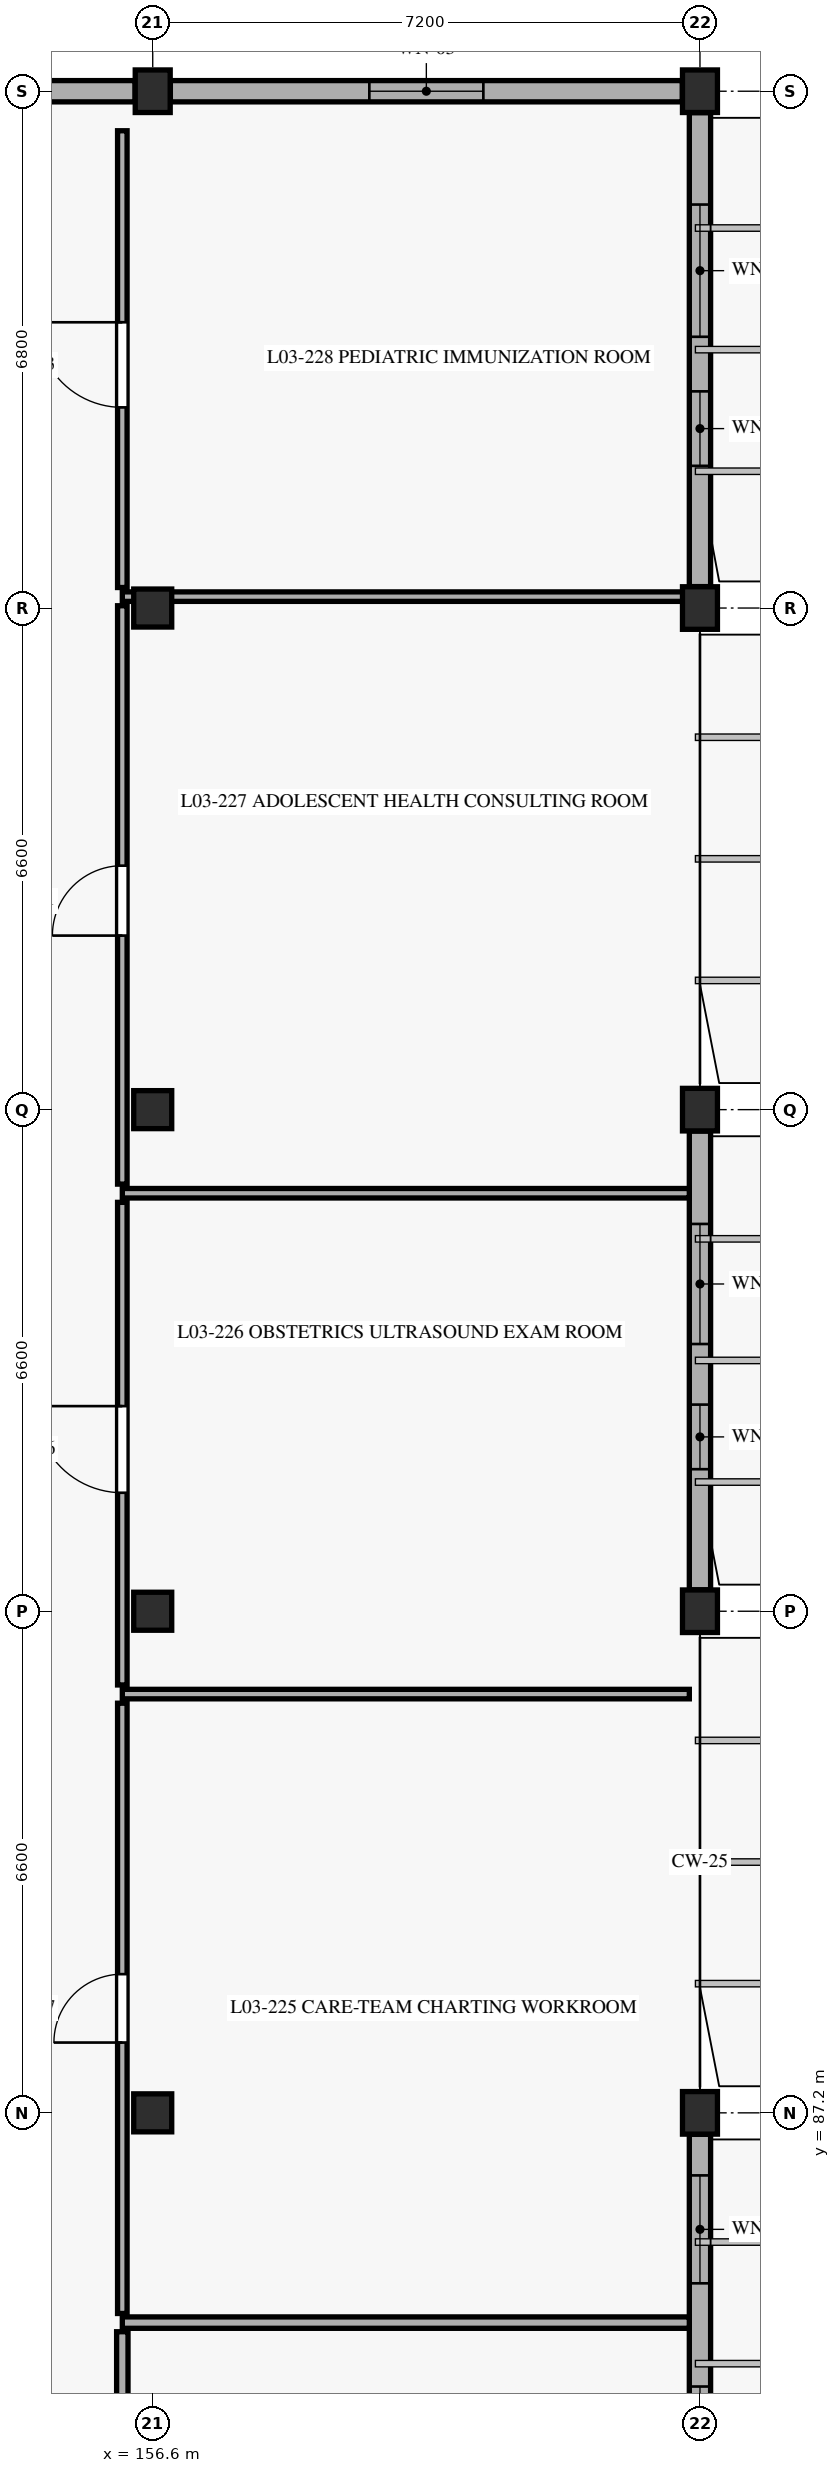
"""IFC4 building model, lengths in metres.
Left out: names, types, materials, properties, quantities, classifications, styles, units other than length and angle.
Written with IfcOpenShell. Run it as: python <this file> out.ifc"""

import sys

from ifc_helpers import new_model, si_unit, direction, frame, frame_2d, origin, origin_with_axes, origin_2d, place, context, subcontext, project, spatial, rectangle, extrude, element, fill, save


model = new_model("IFC4")
c1 = context("Model", 3, precision=1e-05, world=origin(), true_north=direction((0.0, 1.0)))
c2 = subcontext(c1, "Body", "Model", "MODEL_VIEW")
j1 = project(units=[si_unit("LENGTHUNIT", "METRE"), si_unit("PLANEANGLEUNIT", "RADIAN")], contexts=[c1])
p1 = place(None, origin())
s1 = spatial("IfcSite", under=j1, at=p1, CompositionType="ELEMENT")
p2 = place(p1, origin())
s2 = spatial("IfcBuilding", under=s1, at=p2, CompositionType="ELEMENT")
p3 = place(p2, frame((0.0, 0.0, 9.3)))
s3 = spatial("IfcBuildingStorey", under=s2, at=p3, CompositionType="ELEMENT", Elevation=9.3)
for number, where, z_axis, x_axis in (
    (1, (156.6, 87.2, 0.0), (0.0, 0.0, 1.0), (1.0, 0.0, 0.0)),
    (2, (156.6, 93.8, 0.0), (0.0, 0.0, 1.0), (1.0, 0.0, 0.0)),
    (3, (156.6, 100.4, 0.0), (0.0, 0.0, 1.0), (1.0, 0.0, 0.0)),
    (4, (156.6, 107.0, 0.0), (0.0, 0.0, 1.0), (1.0, 0.0, 0.0)),
):
    element("IfcColumn", number, at=place(p3, frame(where, z_axis=z_axis, x_axis=x_axis)), inside=s3, PredefinedType="COLUMN", context=c2, shape_type="SweptSolid", body=[
        extrude(rectangle(XDim=0.5, YDim=0.5, at=origin_2d()), origin(), (0.0, 0.0, 1.0), 4.2),
    ])
for number, where, z_axis, x_axis in (
    (5, (156.6, 113.8, 0.0), (0.0, 0.0, 1.0), (1.0, 0.0, 0.0)),
    (6, (163.8, 87.2, 0.0), (0.0, 0.0, 1.0), (1.0, 0.0, 0.0)),
    (7, (163.8, 93.8, 0.0), (0.0, 0.0, 1.0), (1.0, 0.0, 0.0)),
    (8, (163.8, 100.4, 0.0), (0.0, 0.0, 1.0), (1.0, 0.0, 0.0)),
    (9, (163.8, 107.0, 0.0), (0.0, 0.0, 1.0), (1.0, 0.0, 0.0)),
    (10, (163.8, 113.8, 0.0), (0.0, 0.0, 1.0), (1.0, 0.0, 0.0)),
):
    element("IfcColumn", number, at=place(p3, frame(where, z_axis=z_axis, x_axis=x_axis)), inside=s3, PredefinedType="COLUMN", context=c2, shape_type="SweptSolid", body=[
        extrude(rectangle(XDim=0.46, YDim=0.56, at=origin_2d()), origin(), (0.0, 0.0, 1.0), 4.2),
    ])
p4 = place(p3, frame((163.8, 80.882, 0.0), z_axis=(0.0, 0.0, 1.0), x_axis=(0.0, 1.0, 0.0)))
e11 = element("IfcWall", 11, at=p4, inside=s3, PredefinedType="SOLIDWALL", context=c2, shape_type="SweptSolid", body=[
    extrude(rectangle(XDim=6.036, YDim=0.28, at=frame_2d((3.018, 0.0))), origin(), (0.0, 0.0, 1.0), 3.48),
])
p5 = place(p4, frame((0.867, 0.0, 0.88)))
e12 = element("IfcOpeningElement", 12, at=p5, cuts=e11, PredefinedType="OPENING", context=c2, shape_type="SweptSolid", body=[
    extrude(rectangle(XDim=1.85, YDim=1.65, at=frame_2d((0.925, 0.825))), frame((0.0, 0.15, 0.0), z_axis=(0.0, -1.0, 0.0), x_axis=(1.0, 0.0, 0.0)), (0.0, 0.0, 1.0), 0.3),
])
p6 = place(p4, frame((4.075, 0.0, 0.88)))
e13 = element("IfcOpeningElement", 13, at=p6, cuts=e11, PredefinedType="OPENING", context=c2, shape_type="SweptSolid", body=[
    extrude(rectangle(XDim=1.42, YDim=1.9, at=frame_2d((0.71, 0.95))), frame((0.0, 0.15, 0.0), z_axis=(0.0, -1.0, 0.0), x_axis=(1.0, 0.0, 0.0)), (0.0, 0.0, 1.0), 0.3),
])
p7 = place(p3, frame((163.8, 94.082, 0.0), z_axis=(0.0, 0.0, 1.0), x_axis=(0.0, 1.0, 0.0)))
e14 = element("IfcWall", 14, at=p7, inside=s3, PredefinedType="SOLIDWALL", context=c2, shape_type="SweptSolid", body=[
    extrude(rectangle(XDim=6.036, YDim=0.28, at=frame_2d((3.018, 0.0))), origin(), (0.0, 0.0, 1.0), 3.48),
])
p8 = place(p7, frame((1.587, 0.0, 0.88)))
e15 = element("IfcOpeningElement", 15, at=p8, cuts=e14, PredefinedType="OPENING", context=c2, shape_type="SweptSolid", body=[
    extrude(rectangle(XDim=0.85, YDim=2.1, at=frame_2d((0.425, 1.05))), frame((0.0, 0.15, 0.0), z_axis=(0.0, -1.0, 0.0), x_axis=(1.0, 0.0, 0.0)), (0.0, 0.0, 1.0), 0.3),
])
p9 = place(p7, frame((3.234, 0.0, 0.88)))
e16 = element("IfcOpeningElement", 16, at=p9, cuts=e14, PredefinedType="OPENING", context=c2, shape_type="SweptSolid", body=[
    extrude(rectangle(XDim=1.58, YDim=1.9, at=frame_2d((0.79, 0.95))), frame((0.0, 0.15, 0.0), z_axis=(0.0, -1.0, 0.0), x_axis=(1.0, 0.0, 0.0)), (0.0, 0.0, 1.0), 0.3),
])
p10 = place(p3, frame((163.8, 107.282, 0.0), z_axis=(0.0, 0.0, 1.0), x_axis=(0.0, 1.0, 0.0)))
e17 = element("IfcWall", 17, at=p10, inside=s3, PredefinedType="SOLIDWALL", context=c2, shape_type="SweptSolid", body=[
    extrude(rectangle(XDim=6.236, YDim=0.28, at=frame_2d((3.118, 0.0))), origin(), (0.0, 0.0, 1.0), 3.48),
])
p11 = place(p10, frame((1.589, 0.0, 0.88)))
e18 = element("IfcOpeningElement", 18, at=p11, cuts=e17, PredefinedType="OPENING", context=c2, shape_type="SweptSolid", body=[
    extrude(rectangle(XDim=0.98, YDim=2.1, at=frame_2d((0.49, 1.05))), frame((0.0, 0.15, 0.0), z_axis=(0.0, -1.0, 0.0), x_axis=(1.0, 0.0, 0.0)), (0.0, 0.0, 1.0), 0.3),
])
p12 = place(p10, frame((3.287, 0.0, 0.88)))
e19 = element("IfcOpeningElement", 19, at=p12, cuts=e17, PredefinedType="OPENING", context=c2, shape_type="SweptSolid", body=[
    extrude(rectangle(XDim=1.74, YDim=1.9, at=frame_2d((0.87, 0.95))), frame((0.0, 0.15, 0.0), z_axis=(0.0, -1.0, 0.0), x_axis=(1.0, 0.0, 0.0)), (0.0, 0.0, 1.0), 0.3),
])
p13 = place(p3, frame((163.568, 113.8, 0.0), z_axis=(0.0, 0.0, 1.0), x_axis=(-1.0, 0.0, 0.0)))
e20 = element("IfcWall", 20, at=p13, inside=s3, PredefinedType="SOLIDWALL", context=c2, shape_type="SweptSolid", body=[
    extrude(rectangle(XDim=6.736, YDim=0.28, at=frame_2d((3.368, 0.0))), origin(), (0.0, 0.0, 1.0), 3.4),
])
p14 = place(p13, frame((2.618, 0.0, 0.9)))
e21 = element("IfcOpeningElement", 21, at=p14, cuts=e20, PredefinedType="OPENING", context=c2, shape_type="SweptSolid", body=[
    extrude(rectangle(XDim=1.5, YDim=2.2, at=frame_2d((0.75, 1.1))), frame((0.0, 0.15, 0.0), z_axis=(0.0, -1.0, 0.0), x_axis=(1.0, 0.0, 0.0)), (0.0, 0.0, 1.0), 0.3),
])
p15 = place(p3, frame((156.368, 113.8, 0.0), z_axis=(0.0, 0.0, 1.0), x_axis=(-1.0, 0.0, 0.0)))
e22 = element("IfcWall", 22, at=p15, inside=s3, PredefinedType="SOLIDWALL", context=c2, shape_type="SweptSolid", body=[
    extrude(rectangle(XDim=7.336, YDim=0.28, at=frame_2d((3.668, 0.0))), origin(), (0.0, 0.0, 1.0), 3.4),
])
p16 = place(p15, frame((2.918, 0.0, 0.9)))
e23 = element("IfcOpeningElement", 23, at=p16, cuts=e22, PredefinedType="OPENING", context=c2, shape_type="SweptSolid", body=[
    extrude(rectangle(XDim=1.5, YDim=2.2, at=frame_2d((0.75, 1.1))), frame((0.0, 0.15, 0.0), z_axis=(0.0, -1.0, 0.0), x_axis=(1.0, 0.0, 0.0)), (0.0, 0.0, 1.0), 0.3),
])
p17 = place(p3, frame((156.2, 77.06, 0.0), z_axis=(0.0, 0.0, 1.0), x_axis=(0.0, 1.0, 0.0)))
e24 = element("IfcWall", 24, at=p17, inside=s3, PredefinedType="PARTITIONING", context=c2, shape_type="SweptSolid", body=[
    extrude(rectangle(XDim=7.26, YDim=0.15, at=frame_2d((3.63, 0.0))), origin(), (0.0, 0.0, 1.0), 3.495),
])
p18 = place(p17, frame((4.353, 0.0, 0.0)))
e25 = element("IfcOpeningElement", 25, at=p18, cuts=e24, PredefinedType="OPENING", context=c2, shape_type="SweptSolid", body=[
    extrude(rectangle(XDim=0.98, YDim=2.12, at=frame_2d((0.49, 1.06))), frame((0.0, 0.085, 0.0), z_axis=(0.0, -1.0, 0.0), x_axis=(1.0, 0.0, 0.0)), (0.0, 0.0, 1.0), 0.17),
])
p19 = place(p3, frame((156.2, 84.44, 0.0), z_axis=(0.0, 0.0, 1.0), x_axis=(1.0, 0.0, 0.0)))
e26 = element("IfcWall", 26, at=p19, inside=s3, PredefinedType="PARTITIONING", context=c2, shape_type="SweptSolid", body=[
    extrude(rectangle(XDim=7.46, YDim=0.15, at=frame_2d((3.73, 0.0))), origin(), (0.0, 0.0, 1.0), 3.475),
])
p20 = place(p3, frame((156.2, 84.56, 0.0), z_axis=(0.0, 0.0, 1.0), x_axis=(0.0, 1.0, 0.0)))
e27 = element("IfcWall", 27, at=p20, inside=s3, PredefinedType="PARTITIONING", context=c2, shape_type="SweptSolid", body=[
    extrude(rectangle(XDim=8.03, YDim=0.125, at=frame_2d((4.015, 0.0))), origin(), (0.0, 0.0, 1.0), 3.495),
])
p21 = place(p20, frame((3.565, 0.0, 0.0)))
e28 = element("IfcOpeningElement", 28, at=p21, cuts=e27, PredefinedType="OPENING", context=c2, shape_type="SweptSolid", body=[
    extrude(rectangle(XDim=0.9, YDim=2.12, at=frame_2d((0.45, 1.06))), frame((0.0, 0.073, 0.0), z_axis=(0.0, -1.0, 0.0), x_axis=(1.0, 0.0, 0.0)), (0.0, 0.0, 1.0), 0.145),
])
p22 = place(p3, frame((156.2, 92.71, 0.0), z_axis=(0.0, 0.0, 1.0), x_axis=(1.0, 0.0, 0.0)))
e29 = element("IfcWall", 29, at=p22, inside=s3, PredefinedType="PARTITIONING", context=c2, shape_type="SweptSolid", body=[
    extrude(rectangle(XDim=7.46, YDim=0.125, at=frame_2d((3.73, 0.0))), origin(), (0.0, 0.0, 1.0), 3.475),
])
p23 = place(p3, frame((156.2, 92.83, 0.0), z_axis=(0.0, 0.0, 1.0), x_axis=(0.0, 1.0, 0.0)))
e30 = element("IfcWall", 30, at=p23, inside=s3, PredefinedType="PARTITIONING", context=c2, shape_type="SweptSolid", body=[
    extrude(rectangle(XDim=6.35, YDim=0.125, at=frame_2d((3.175, 0.0))), origin(), (0.0, 0.0, 1.0), 3.495),
])
p24 = place(p23, frame((2.529, 0.0, 0.0)))
e31 = element("IfcOpeningElement", 31, at=p24, cuts=e30, PredefinedType="OPENING", context=c2, shape_type="SweptSolid", body=[
    extrude(rectangle(XDim=1.14, YDim=2.22, at=frame_2d((0.57, 1.11))), frame((0.0, 0.073, 0.0), z_axis=(0.0, -1.0, 0.0), x_axis=(1.0, 0.0, 0.0)), (0.0, 0.0, 1.0), 0.145),
])
p25 = place(p3, frame((156.2, 99.3, 0.0), z_axis=(0.0, 0.0, 1.0), x_axis=(1.0, 0.0, 0.0)))
e32 = element("IfcWall", 32, at=p25, inside=s3, PredefinedType="PARTITIONING", context=c2, shape_type="SweptSolid", body=[
    extrude(rectangle(XDim=7.46, YDim=0.125, at=frame_2d((3.73, 0.0))), origin(), (0.0, 0.0, 1.0), 3.475),
])
p26 = place(p3, frame((156.2, 99.42, 0.0), z_axis=(0.0, 0.0, 1.0), x_axis=(0.0, 1.0, 0.0)))
e33 = element("IfcWall", 33, at=p26, inside=s3, PredefinedType="PARTITIONING", context=c2, shape_type="SweptSolid", body=[
    extrude(rectangle(XDim=7.61, YDim=0.125, at=frame_2d((3.805, 0.0))), origin(), (0.0, 0.0, 1.0), 3.495),
])
p27 = place(p26, frame((3.27, 0.0, 0.0)))
e34 = element("IfcOpeningElement", 34, at=p27, cuts=e33, PredefinedType="OPENING", context=c2, shape_type="SweptSolid", body=[
    extrude(rectangle(XDim=0.92, YDim=2.15, at=frame_2d((0.46, 1.075))), frame((0.0, 0.073, 0.0), z_axis=(0.0, -1.0, 0.0), x_axis=(1.0, 0.0, 0.0)), (0.0, 0.0, 1.0), 0.145),
])
p28 = place(p3, frame((156.2, 107.15, 0.0), z_axis=(0.0, 0.0, 1.0), x_axis=(1.0, 0.0, 0.0)))
e35 = element("IfcWall", 35, at=p28, inside=s3, PredefinedType="PARTITIONING", context=c2, shape_type="SweptSolid", body=[
    extrude(rectangle(XDim=7.46, YDim=0.125, at=frame_2d((3.73, 0.0))), origin(), (0.0, 0.0, 1.0), 3.495),
])
p29 = place(p3, frame((156.2, 107.27, 0.0), z_axis=(0.0, 0.0, 1.0), x_axis=(0.0, 1.0, 0.0)))
e36 = element("IfcWall", 36, at=p29, inside=s3, PredefinedType="PARTITIONING", context=c2, shape_type="SweptSolid", body=[
    extrude(rectangle(XDim=6.01, YDim=0.125, at=frame_2d((3.005, 0.0))), origin(), (0.0, 0.0, 1.0), 3.495),
])
p30 = place(p29, frame((2.37, 0.0, 0.0)))
e37 = element("IfcOpeningElement", 37, at=p30, cuts=e36, PredefinedType="OPENING", context=c2, shape_type="SweptSolid", body=[
    extrude(rectangle(XDim=1.12, YDim=2.2, at=frame_2d((0.56, 1.1))), frame((0.0, 0.073, 0.0), z_axis=(0.0, -1.0, 0.0), x_axis=(1.0, 0.0, 0.0)), (0.0, 0.0, 1.0), 0.145),
])
p31 = place(p5, origin_with_axes())
e38 = element("IfcWindow", 38, at=p31, inside=s3, PartitioningType="SINGLE_PANEL", PredefinedType="WINDOW", context=c2, shape_type="SweptSolid", body=[
    extrude(rectangle(XDim=1.85, YDim=1.65, at=frame_2d((0.925, 0.825))), frame((0.0, 0.03, 0.0), z_axis=(0.0, -1.0, 0.0), x_axis=(1.0, 0.0, 0.0)), (0.0, 0.0, 1.0), 0.06),
])
fill(e12, e38)
p32 = place(p6, origin_with_axes())
e39 = element("IfcWindow", 39, at=p32, inside=s3, PartitioningType="SINGLE_PANEL", PredefinedType="WINDOW", context=c2, shape_type="SweptSolid", body=[
    extrude(rectangle(XDim=1.42, YDim=1.9, at=frame_2d((0.71, 0.95))), frame((0.0, 0.03, 0.0), z_axis=(0.0, -1.0, 0.0), x_axis=(1.0, 0.0, 0.0)), (0.0, 0.0, 1.0), 0.06),
])
fill(e13, e39)
p33 = place(p8, origin_with_axes())
e40 = element("IfcWindow", 40, at=p33, inside=s3, PartitioningType="SINGLE_PANEL", PredefinedType="WINDOW", context=c2, shape_type="SweptSolid", body=[
    extrude(rectangle(XDim=0.85, YDim=2.1, at=frame_2d((0.425, 1.05))), frame((0.0, 0.03, 0.0), z_axis=(0.0, -1.0, 0.0), x_axis=(1.0, 0.0, 0.0)), (0.0, 0.0, 1.0), 0.06),
])
fill(e15, e40)
p34 = place(p9, origin_with_axes())
e41 = element("IfcWindow", 41, at=p34, inside=s3, PartitioningType="SINGLE_PANEL", PredefinedType="WINDOW", context=c2, shape_type="SweptSolid", body=[
    extrude(rectangle(XDim=1.58, YDim=1.9, at=frame_2d((0.79, 0.95))), frame((0.0, 0.03, 0.0), z_axis=(0.0, -1.0, 0.0), x_axis=(1.0, 0.0, 0.0)), (0.0, 0.0, 1.0), 0.06),
])
fill(e16, e41)
p35 = place(p11, origin_with_axes())
e42 = element("IfcWindow", 42, at=p35, inside=s3, PartitioningType="SINGLE_PANEL", PredefinedType="WINDOW", context=c2, shape_type="SweptSolid", body=[
    extrude(rectangle(XDim=0.98, YDim=2.1, at=frame_2d((0.49, 1.05))), frame((0.0, 0.03, 0.0), z_axis=(0.0, -1.0, 0.0), x_axis=(1.0, 0.0, 0.0)), (0.0, 0.0, 1.0), 0.06),
])
fill(e18, e42)
p36 = place(p12, origin_with_axes())
e43 = element("IfcWindow", 43, at=p36, inside=s3, PartitioningType="SINGLE_PANEL", PredefinedType="WINDOW", context=c2, shape_type="SweptSolid", body=[
    extrude(rectangle(XDim=1.74, YDim=1.9, at=frame_2d((0.87, 0.95))), frame((0.0, 0.03, 0.0), z_axis=(0.0, -1.0, 0.0), x_axis=(1.0, 0.0, 0.0)), (0.0, 0.0, 1.0), 0.06),
])
fill(e19, e43)
p37 = place(p14, origin_with_axes())
e44 = element("IfcWindow", 44, at=p37, inside=s3, PartitioningType="SINGLE_PANEL", PredefinedType="WINDOW", context=c2, shape_type="SweptSolid", body=[
    extrude(rectangle(XDim=1.5, YDim=2.2, at=frame_2d((0.75, 1.1))), frame((0.0, 0.03, 0.0), z_axis=(0.0, -1.0, 0.0), x_axis=(1.0, 0.0, 0.0)), (0.0, 0.0, 1.0), 0.06),
])
fill(e21, e44)
p38 = place(p21, frame((0.9, 0.0, 0.0), z_axis=(0.0, 0.0, 1.0), x_axis=(-1.0, 0.0, 0.0)))
e45 = element("IfcDoor", 45, at=p38, inside=s3, OperationType="SINGLE_SWING_RIGHT", PredefinedType="DOOR", context=c2, shape_type="SweptSolid", body=[
    extrude(rectangle(XDim=0.9, YDim=2.12, at=frame_2d((0.45, 1.06))), frame((0.0, 0.025, 0.0), z_axis=(0.0, -1.0, 0.0), x_axis=(1.0, 0.0, 0.0)), (0.0, 0.0, 1.0), 0.05),
])
fill(e28, e45)
p39 = place(p24, frame((1.14, 0.0, 0.0), z_axis=(0.0, 0.0, 1.0), x_axis=(-1.0, 0.0, 0.0)))
e46 = element("IfcDoor", 46, at=p39, inside=s3, OperationType="SINGLE_SWING_LEFT", PredefinedType="DOOR", context=c2, shape_type="SweptSolid", body=[
    extrude(rectangle(XDim=1.14, YDim=2.22, at=frame_2d((0.57, 1.11))), frame((0.0, 0.025, 0.0), z_axis=(0.0, -1.0, 0.0), x_axis=(1.0, 0.0, 0.0)), (0.0, 0.0, 1.0), 0.05),
])
fill(e31, e46)
p40 = place(p27, frame((0.92, 0.0, 0.0), z_axis=(0.0, 0.0, 1.0), x_axis=(-1.0, 0.0, 0.0)))
e47 = element("IfcDoor", 47, at=p40, inside=s3, OperationType="SINGLE_SWING_RIGHT", PredefinedType="DOOR", context=c2, shape_type="SweptSolid", body=[
    extrude(rectangle(XDim=0.92, YDim=2.15, at=frame_2d((0.46, 1.075))), frame((0.0, 0.025, 0.0), z_axis=(0.0, -1.0, 0.0), x_axis=(1.0, 0.0, 0.0)), (0.0, 0.0, 1.0), 0.05),
])
fill(e34, e47)
p41 = place(p30, frame((1.12, 0.0, 0.0), z_axis=(0.0, 0.0, 1.0), x_axis=(-1.0, 0.0, 0.0)))
e48 = element("IfcDoor", 48, at=p41, inside=s3, OperationType="SINGLE_SWING_LEFT", PredefinedType="DOOR", context=c2, shape_type="SweptSolid", body=[
    extrude(rectangle(XDim=1.12, YDim=2.2, at=frame_2d((0.56, 1.1))), frame((0.0, 0.025, 0.0), z_axis=(0.0, -1.0, 0.0), x_axis=(1.0, 0.0, 0.0)), (0.0, 0.0, 1.0), 0.05),
])
fill(e37, e48)
save(model, sys.argv[1])
